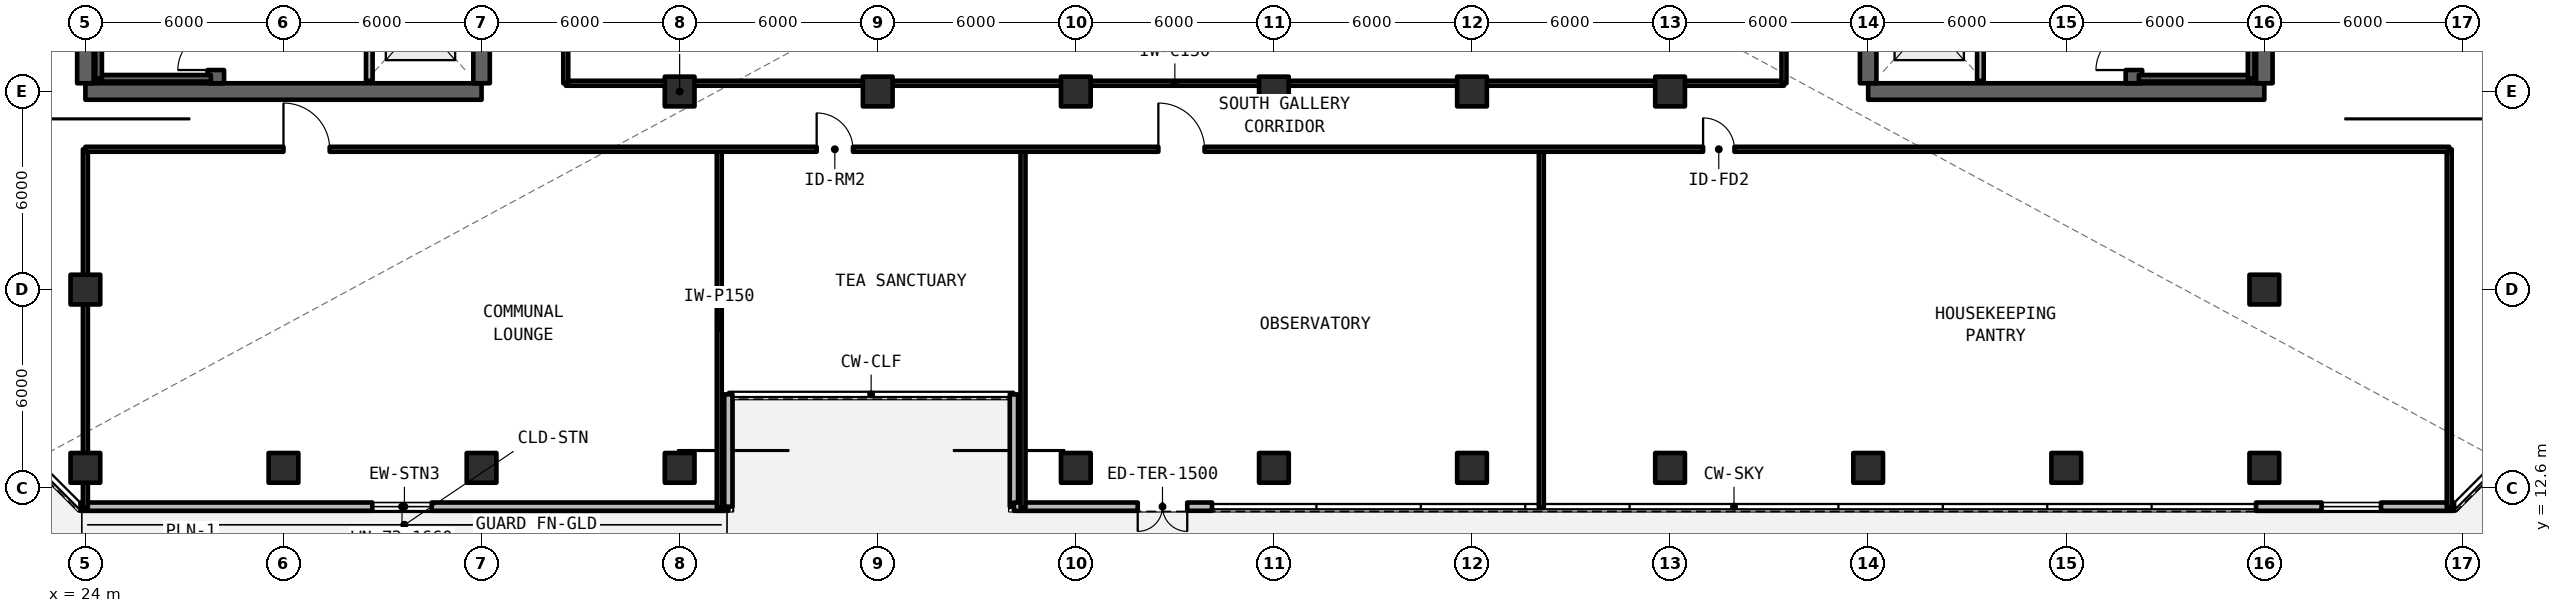
"""IFC4 building model, lengths in metres.
Left out: names, types, materials, properties, quantities, classifications, styles, units other than length and angle.
Written with IfcOpenShell. Run it as: python <this file> out.ifc"""

import sys

from ifc_helpers import new_model, si_unit, direction, frame, frame_2d, origin, origin_2d, place, context, subcontext, project, spatial, rectangle, extrude, element, fill, save


model = new_model("IFC4")
c1 = context("Model", 3, precision=1e-05, world=origin(), true_north=direction((0.0, 1.0)))
c2 = subcontext(c1, "Body", "Model", "MODEL_VIEW")
j1 = project(units=[si_unit("LENGTHUNIT", "METRE"), si_unit("PLANEANGLEUNIT", "RADIAN")], contexts=[c1])
p1 = place(None, origin())
s1 = spatial("IfcSite", under=j1, at=p1, CompositionType="ELEMENT")
p2 = place(p1, origin())
s2 = spatial("IfcBuilding", under=s1, at=p2, CompositionType="ELEMENT")
p3 = place(p2, frame((0.0, 0.0, 128.04)))
s3 = spatial("IfcBuildingStorey", under=s2, at=p3, CompositionType="ELEMENT", Elevation=128.04)
p4 = place(p3, frame((24.0, 24.6, 0.0), z_axis=(0.0, 0.0, 1.0), x_axis=(1.0, 0.0, 0.0)))
e1 = element("IfcWall", 1, at=p4, inside=s3, PredefinedType="SHEAR", context=c2, shape_type="SweptSolid", body=[
    extrude(rectangle(XDim=12.0, YDim=0.5, at=frame_2d((6.0, 0.0))), origin(), (0.0, 0.0, 1.0), 3.96),
])
p5 = place(p3, frame((24.0, 24.85, 0.0), z_axis=(0.0, 0.0, 1.0), x_axis=(0.0, 1.0, 0.0)))
e2 = element("IfcWall", 2, at=p5, inside=s3, PredefinedType="SHEAR", context=c2, shape_type="SweptSolid", body=[
    extrude(rectangle(XDim=17.5, YDim=0.5, at=frame_2d((8.75, 0.0))), origin(), (0.0, 0.0, 1.0), 3.96),
])
p6 = place(p3, frame((36.0, 24.85, 0.0), z_axis=(0.0, 0.0, 1.0), x_axis=(0.0, 1.0, 0.0)))
e3 = element("IfcWall", 3, at=p6, inside=s3, PredefinedType="SHEAR", context=c2, shape_type="SweptSolid", body=[
    extrude(rectangle(XDim=8.95, YDim=0.5, at=frame_2d((4.475, 0.0))), origin(), (0.0, 0.0, 1.0), 3.96),
])
p7 = place(p3, frame((27.95, 24.85, 0.0), z_axis=(0.0, 0.0, 1.0), x_axis=(0.0, 1.0, 0.0)))
e4 = element("IfcWall", 4, at=p7, inside=s3, PredefinedType="SHEAR", context=c2, shape_type="SweptSolid", body=[
    extrude(rectangle(XDim=17.5, YDim=0.5, at=frame_2d((8.75, 0.0))), origin(), (0.0, 0.0, 1.0), 3.96),
])
p8 = place(p7, frame((0.4, 0.0, 0.0)))
e5 = element("IfcOpeningElement", 5, at=p8, cuts=e4, PredefinedType="OPENING", context=c2, shape_type="SweptSolid", body=[
    extrude(rectangle(XDim=1.15, YDim=2.15, at=frame_2d((0.575, 1.075))), frame((0.0, 0.26, 0.0), z_axis=(0.0, -1.0, 0.0), x_axis=(1.0, 0.0, 0.0)), (0.0, 0.0, 1.0), 0.52),
])
p9 = place(p7, frame((9.6, 0.0, 0.0)))
e6 = element("IfcOpeningElement", 6, at=p9, cuts=e4, PredefinedType="OPENING", context=c2, shape_type="SweptSolid", body=[
    extrude(rectangle(XDim=1.15, YDim=2.15, at=frame_2d((0.575, 1.075))), frame((0.0, 0.26, 0.0), z_axis=(0.0, -1.0, 0.0), x_axis=(1.0, 0.0, 0.0)), (0.0, 0.0, 1.0), 0.52),
])
p10 = place(p3, frame((78.0, 24.6, 0.0), z_axis=(0.0, 0.0, 1.0), x_axis=(1.0, 0.0, 0.0)))
e7 = element("IfcWall", 7, at=p10, inside=s3, PredefinedType="SHEAR", context=c2, shape_type="SweptSolid", body=[
    extrude(rectangle(XDim=12.0, YDim=0.5, at=frame_2d((6.0, 0.0))), origin(), (0.0, 0.0, 1.0), 3.96),
])
p11 = place(p3, frame((90.0, 24.85, 0.0), z_axis=(0.0, 0.0, 1.0), x_axis=(0.0, 1.0, 0.0)))
e8 = element("IfcWall", 8, at=p11, inside=s3, PredefinedType="SHEAR", context=c2, shape_type="SweptSolid", body=[
    extrude(rectangle(XDim=17.5, YDim=0.5, at=frame_2d((8.75, 0.0))), origin(), (0.0, 0.0, 1.0), 3.96),
])
p12 = place(p3, frame((78.0, 24.85, 0.0), z_axis=(0.0, 0.0, 1.0), x_axis=(0.0, 1.0, 0.0)))
e9 = element("IfcWall", 9, at=p12, inside=s3, PredefinedType="SHEAR", context=c2, shape_type="SweptSolid", body=[
    extrude(rectangle(XDim=8.95, YDim=0.5, at=frame_2d((4.475, 0.0))), origin(), (0.0, 0.0, 1.0), 3.96),
])
p13 = place(p3, frame((86.05, 24.85, 0.0), z_axis=(0.0, 0.0, 1.0), x_axis=(0.0, 1.0, 0.0)))
e10 = element("IfcWall", 10, at=p13, inside=s3, PredefinedType="SHEAR", context=c2, shape_type="SweptSolid", body=[
    extrude(rectangle(XDim=17.5, YDim=0.5, at=frame_2d((8.75, 0.0))), origin(), (0.0, 0.0, 1.0), 3.96),
])
p14 = place(p13, frame((0.4, 0.0, 0.0)))
e11 = element("IfcOpeningElement", 11, at=p14, cuts=e10, PredefinedType="OPENING", context=c2, shape_type="SweptSolid", body=[
    extrude(rectangle(XDim=1.15, YDim=2.15, at=frame_2d((0.575, 1.075))), frame((0.0, 0.26, 0.0), z_axis=(0.0, -1.0, 0.0), x_axis=(1.0, 0.0, 0.0)), (0.0, 0.0, 1.0), 0.52),
])
p15 = place(p13, frame((9.6, 0.0, 0.0)))
e12 = element("IfcOpeningElement", 12, at=p15, cuts=e10, PredefinedType="OPENING", context=c2, shape_type="SweptSolid", body=[
    extrude(rectangle(XDim=1.15, YDim=2.15, at=frame_2d((0.575, 1.075))), frame((0.0, 0.26, 0.0), z_axis=(0.0, -1.0, 0.0), x_axis=(1.0, 0.0, 0.0)), (0.0, 0.0, 1.0), 0.52),
])
for number, where, z_axis, x_axis in (
    (13, (42.0, 24.6, 0.0), (0.0, 0.0, 1.0), (1.0, 0.0, 0.0)),
    (14, (48.0, 24.6, 0.0), (0.0, 0.0, 1.0), (1.0, 0.0, 0.0)),
    (15, (54.0, 24.6, 0.0), (0.0, 0.0, 1.0), (1.0, 0.0, 0.0)),
    (16, (60.0, 24.6, 0.0), (0.0, 0.0, 1.0), (1.0, 0.0, 0.0)),
    (17, (66.0, 24.6, 0.0), (0.0, 0.0, 1.0), (1.0, 0.0, 0.0)),
    (18, (72.0, 24.6, 0.0), (0.0, 0.0, 1.0), (1.0, 0.0, 0.0)),
    (19, (24.0, 18.6, 0.0), (0.0, 0.0, 1.0), (1.0, 0.0, 0.0)),
    (20, (90.0, 18.6, 0.0), (0.0, 0.0, 1.0), (1.0, 0.0, 0.0)),
):
    element("IfcColumn", number, at=place(p3, frame(where, z_axis=z_axis, x_axis=x_axis)), inside=s3, PredefinedType="COLUMN", context=c2, shape_type="SweptSolid", body=[
        extrude(rectangle(XDim=0.9, YDim=0.9, at=origin_2d()), origin(), (0.0, 0.0, 1.0), 3.96),
    ])
for number, where, z_axis, x_axis in (
    (21, (24.0, 13.2, -0.28), (0.0, 0.0, 1.0), (1.0, 0.0, 0.0)),
    (22, (30.0, 13.2, -0.28), (0.0, 0.0, 1.0), (1.0, 0.0, 0.0)),
    (23, (36.0, 13.2, -0.28), (0.0, 0.0, 1.0), (1.0, 0.0, 0.0)),
    (24, (42.0, 13.2, -0.28), (0.0, 0.0, 1.0), (1.0, 0.0, 0.0)),
    (25, (54.0, 13.2, -0.28), (0.0, 0.0, 1.0), (1.0, 0.0, 0.0)),
    (26, (60.0, 13.2, -0.28), (0.0, 0.0, 1.0), (1.0, 0.0, 0.0)),
    (27, (66.0, 13.2, -0.28), (0.0, 0.0, 1.0), (1.0, 0.0, 0.0)),
    (28, (72.0, 13.2, -0.28), (0.0, 0.0, 1.0), (1.0, 0.0, 0.0)),
    (29, (78.0, 13.2, -0.28), (0.0, 0.0, 1.0), (1.0, 0.0, 0.0)),
    (30, (84.0, 13.2, -0.28), (0.0, 0.0, 1.0), (1.0, 0.0, 0.0)),
    (31, (90.0, 13.2, -0.28), (0.0, 0.0, 1.0), (1.0, 0.0, 0.0)),
):
    element("IfcColumn", number, at=place(p3, frame(where, z_axis=z_axis, x_axis=x_axis)), inside=s3, PredefinedType="COLUMN", context=c2, shape_type="SweptSolid", body=[
        extrude(rectangle(XDim=0.9, YDim=0.9, at=origin_2d()), origin(), (0.0, 0.0, 1.0), 4.24),
    ])
p16 = place(p3, frame((23.852, 12.025, 0.0), z_axis=(0.0, 0.0, 1.0), x_axis=(1.0, 0.0, 0.0)))
e32 = element("IfcWall", 32, at=p16, inside=s3, PredefinedType="SOLIDWALL", context=c2, shape_type="SweptSolid", body=[
    extrude(rectangle(XDim=19.623, YDim=0.25, at=frame_2d((9.812, 0.0))), origin(), (0.0, 0.0, 1.0), 3.74),
])
p17 = place(p16, frame((8.838, 0.0, 0.78)))
e33 = element("IfcOpeningElement", 33, at=p17, cuts=e32, PredefinedType="OPENING", context=c2, shape_type="SweptSolid", body=[
    extrude(rectangle(XDim=1.8, YDim=1.66, at=frame_2d((0.9, 0.83))), frame((0.0, 0.135, 0.0), z_axis=(0.0, -1.0, 0.0), x_axis=(1.0, 0.0, 0.0)), (0.0, 0.0, 1.0), 0.27),
])
for number, where, z_axis, x_axis in (
    (34, (43.475, 12.025, 0.0), (0.0, 0.0, 1.0), (0.0, 1.0, 0.0)),
    (35, (52.125, 15.425, 0.0), (0.0, 0.0, 1.0), (0.0, -1.0, 0.0)),
):
    element("IfcWall", number, at=place(p3, frame(where, z_axis=z_axis, x_axis=x_axis)), inside=s3, PredefinedType="SOLIDWALL", context=c2, shape_type="SweptSolid", body=[
        extrude(rectangle(XDim=3.4, YDim=0.25, at=frame_2d((1.7, 0.0))), origin(), (0.0, 0.0, 1.0), 3.74),
    ])
p18 = place(p3, frame((52.125, 12.025, 0.0), z_axis=(0.0, 0.0, 1.0), x_axis=(1.0, 0.0, 0.0)))
e36 = element("IfcWall", 36, at=p18, inside=s3, PredefinedType="SOLIDWALL", context=c2, shape_type="SweptSolid", body=[
    extrude(rectangle(XDim=6.0, YDim=0.25, at=frame_2d((3.0, 0.0))), origin(), (0.0, 0.0, 1.0), 3.74),
])
p19 = place(p18, frame((3.75, 0.0, 0.0)))
e37 = element("IfcOpeningElement", 37, at=p19, cuts=e36, PredefinedType="OPENING", context=c2, shape_type="SweptSolid", body=[
    extrude(rectangle(XDim=1.5, YDim=2.2, at=frame_2d((0.75, 1.1))), frame((0.0, 0.135, 0.0), z_axis=(0.0, -1.0, 0.0), x_axis=(1.0, 0.0, 0.0)), (0.0, 0.0, 1.0), 0.27),
])
p20 = place(p3, frame((89.748, 12.025, 0.0), z_axis=(0.0, 0.0, 1.0), x_axis=(1.0, 0.0, 0.0)))
e38 = element("IfcWall", 38, at=p20, inside=s3, PredefinedType="SOLIDWALL", context=c2, shape_type="SweptSolid", body=[
    extrude(rectangle(XDim=6.0, YDim=0.25, at=frame_2d((3.0, 0.0))), origin(), (0.0, 0.0, 1.0), 3.74),
])
p21 = place(p20, frame((1.986, 0.0, 0.78)))
e39 = element("IfcOpeningElement", 39, at=p21, cuts=e38, PredefinedType="OPENING", context=c2, shape_type="SweptSolid", body=[
    extrude(rectangle(XDim=1.8, YDim=1.66, at=frame_2d((0.9, 0.83))), frame((0.0, 0.135, 0.0), z_axis=(0.0, -1.0, 0.0), x_axis=(1.0, 0.0, 0.0)), (0.0, 0.0, 1.0), 0.27),
])
p22 = place(p3, frame((32.6, 24.92, 0.0), z_axis=(0.0, 0.0, 1.0), x_axis=(0.0, 1.0, 0.0)))
e40 = element("IfcWall", 40, at=p22, inside=s3, PredefinedType="SOLIDWALL", context=c2, shape_type="SweptSolid", body=[
    extrude(rectangle(XDim=3.58, YDim=0.2, at=frame_2d((1.79, 0.0))), origin(), (0.0, 0.0, 1.0), 2.96),
])
p23 = place(p22, frame((1.3, 0.0, 0.0)))
e41 = element("IfcOpeningElement", 41, at=p23, cuts=e40, PredefinedType="OPENING", context=c2, shape_type="SweptSolid", body=[
    extrude(rectangle(XDim=1.1, YDim=2.2, at=frame_2d((0.55, 1.1))), frame((0.0, 0.11, 0.0), z_axis=(0.0, -1.0, 0.0), x_axis=(1.0, 0.0, 0.0)), (0.0, 0.0, 1.0), 0.22),
])
p24 = place(p3, frame((81.4, 24.92, 0.0), z_axis=(0.0, 0.0, 1.0), x_axis=(0.0, 1.0, 0.0)))
e42 = element("IfcWall", 42, at=p24, inside=s3, PredefinedType="SOLIDWALL", context=c2, shape_type="SweptSolid", body=[
    extrude(rectangle(XDim=3.58, YDim=0.2, at=frame_2d((1.79, 0.0))), origin(), (0.0, 0.0, 1.0), 2.96),
])
p25 = place(p24, frame((1.3, 0.0, 0.0)))
e43 = element("IfcOpeningElement", 43, at=p25, cuts=e42, PredefinedType="OPENING", context=c2, shape_type="SweptSolid", body=[
    extrude(rectangle(XDim=1.1, YDim=2.2, at=frame_2d((0.55, 1.1))), frame((0.0, 0.11, 0.0), z_axis=(0.0, -1.0, 0.0), x_axis=(1.0, 0.0, 0.0)), (0.0, 0.0, 1.0), 0.22),
])
p26 = place(p3, frame((38.55, 24.85, 0.0), z_axis=(0.0, 0.0, 1.0), x_axis=(1.0, 0.0, 0.0)))
e44 = element("IfcWall", 44, at=p26, inside=s3, PredefinedType="SOLIDWALL", context=c2, shape_type="SweptSolid", body=[
    extrude(rectangle(XDim=36.9, YDim=0.15, at=frame_2d((18.45, 0.0))), origin(), (0.0, 0.0, 1.0), 2.96),
])
p27 = place(p3, frame((38.55, 24.85, 0.0), z_axis=(0.0, 0.0, 1.0), x_axis=(0.0, 1.0, 0.0)))
e45 = element("IfcWall", 45, at=p27, inside=s3, PredefinedType="SOLIDWALL", context=c2, shape_type="SweptSolid", body=[
    extrude(rectangle(XDim=17.5, YDim=0.15, at=frame_2d((8.75, 0.0))), origin(), (0.0, 0.0, 1.0), 2.96),
])
p28 = place(p27, frame((7.8, 0.0, 0.0)))
e46 = element("IfcOpeningElement", 46, at=p28, cuts=e45, PredefinedType="OPENING", context=c2, shape_type="SweptSolid", body=[
    extrude(rectangle(XDim=1.4, YDim=2.15, at=frame_2d((0.7, 1.075))), frame((0.0, 0.085, 0.0), z_axis=(0.0, -1.0, 0.0), x_axis=(1.0, 0.0, 0.0)), (0.0, 0.0, 1.0), 0.17),
])
p29 = place(p3, frame((75.45, 24.85, 0.0), z_axis=(0.0, 0.0, 1.0), x_axis=(0.0, 1.0, 0.0)))
e47 = element("IfcWall", 47, at=p29, inside=s3, PredefinedType="SOLIDWALL", context=c2, shape_type="SweptSolid", body=[
    extrude(rectangle(XDim=17.5, YDim=0.15, at=frame_2d((8.75, 0.0))), origin(), (0.0, 0.0, 1.0), 2.96),
])
p30 = place(p3, frame((24.0, 12.0, 0.0), z_axis=(0.0, 0.0, 1.0), x_axis=(0.0, 1.0, 0.0)))
e48 = element("IfcWall", 48, at=p30, inside=s3, PredefinedType="SOLIDWALL", context=c2, shape_type="SweptSolid", body=[
    extrude(rectangle(XDim=10.85, YDim=0.15, at=frame_2d((5.425, 0.0))), origin(), (0.0, 0.0, 1.0), 2.96),
])
for number, where, z_axis, x_axis in (
    (49, (43.2, 12.0, 0.0), (0.0, 0.0, 1.0), (0.0, 1.0, 0.0)),
    (50, (52.4, 12.0, 0.0), (0.0, 0.0, 1.0), (0.0, 1.0, 0.0)),
    (51, (68.1, 12.0, 0.0), (0.0, 0.0, 1.0), (0.0, 1.0, 0.0)),
):
    element("IfcWall", number, at=place(p3, frame(where, z_axis=z_axis, x_axis=x_axis)), inside=s3, PredefinedType="PARTITIONING", context=c2, shape_type="SweptSolid", body=[
        extrude(rectangle(XDim=10.85, YDim=0.15, at=frame_2d((5.425, 0.0))), origin(), (0.0, 0.0, 1.0), 2.96),
    ])
p31 = place(p3, frame((95.6, 12.0, 0.0), z_axis=(0.0, 0.0, 1.0), x_axis=(0.0, 1.0, 0.0)))
e52 = element("IfcWall", 52, at=p31, inside=s3, PredefinedType="SOLIDWALL", context=c2, shape_type="SweptSolid", body=[
    extrude(rectangle(XDim=10.85, YDim=0.15, at=frame_2d((5.425, 0.0))), origin(), (0.0, 0.0, 1.0), 2.96),
])
p32 = place(p3, frame((24.0, 22.85, 0.0), z_axis=(0.0, 0.0, 1.0), x_axis=(1.0, 0.0, 0.0)))
e53 = element("IfcWall", 53, at=p32, inside=s3, PredefinedType="SOLIDWALL", context=c2, shape_type="SweptSolid", body=[
    extrude(rectangle(XDim=71.6, YDim=0.15, at=frame_2d((35.8, 0.0))), origin(), (0.0, 0.0, 1.0), 2.96),
])
p33 = place(p32, frame((6.0, 0.0, 0.0)))
e54 = element("IfcOpeningElement", 54, at=p33, cuts=e53, PredefinedType="OPENING", context=c2, shape_type="SweptSolid", body=[
    extrude(rectangle(XDim=1.4, YDim=2.15, at=frame_2d((0.7, 1.075))), frame((0.0, 0.085, 0.0), z_axis=(0.0, -1.0, 0.0), x_axis=(1.0, 0.0, 0.0)), (0.0, 0.0, 1.0), 0.17),
])
p34 = place(p32, frame((22.15, 0.0, 0.0)))
e55 = element("IfcOpeningElement", 55, at=p34, cuts=e53, PredefinedType="OPENING", context=c2, shape_type="SweptSolid", body=[
    extrude(rectangle(XDim=1.1, YDim=2.15, at=frame_2d((0.55, 1.075))), frame((0.0, 0.085, 0.0), z_axis=(0.0, -1.0, 0.0), x_axis=(1.0, 0.0, 0.0)), (0.0, 0.0, 1.0), 0.17),
])
p35 = place(p32, frame((32.5, 0.0, 0.0)))
e56 = element("IfcOpeningElement", 56, at=p35, cuts=e53, PredefinedType="OPENING", context=c2, shape_type="SweptSolid", body=[
    extrude(rectangle(XDim=1.4, YDim=2.15, at=frame_2d((0.7, 1.075))), frame((0.0, 0.085, 0.0), z_axis=(0.0, -1.0, 0.0), x_axis=(1.0, 0.0, 0.0)), (0.0, 0.0, 1.0), 0.17),
])
p36 = place(p32, frame((49.0, 0.0, 0.0)))
e57 = element("IfcOpeningElement", 57, at=p36, cuts=e53, PredefinedType="OPENING", context=c2, shape_type="SweptSolid", body=[
    extrude(rectangle(XDim=0.95, YDim=2.15, at=frame_2d((0.475, 1.075))), frame((0.0, 0.085, 0.0), z_axis=(0.0, -1.0, 0.0), x_axis=(1.0, 0.0, 0.0)), (0.0, 0.0, 1.0), 0.17),
])
p37 = place(p3, frame((24.4, 25.0, 0.0), z_axis=(0.0, 0.0, 1.0), x_axis=(1.0, 0.0, 0.0)))
e58 = element("IfcWall", 58, at=p37, inside=s3, PredefinedType="SOLIDWALL", context=c2, shape_type="SweptSolid", body=[
    extrude(rectangle(XDim=3.4, YDim=0.2, at=frame_2d((1.7, 0.0))), origin(), (0.0, 0.0, 1.0), 3.96),
])
p38 = place(p3, frame((24.4, 33.0, 0.0), z_axis=(0.0, 0.0, 1.0), x_axis=(0.0, -1.0, 0.0)))
e59 = element("IfcWall", 59, at=p38, inside=s3, PredefinedType="SOLIDWALL", context=c2, shape_type="SweptSolid", body=[
    extrude(rectangle(XDim=8.0, YDim=0.2, at=frame_2d((4.0, 0.0))), origin(), (0.0, 0.0, 1.0), 3.96),
])
p39 = place(p3, frame((86.2, 25.0, 0.0), z_axis=(0.0, 0.0, 1.0), x_axis=(1.0, 0.0, 0.0)))
e60 = element("IfcWall", 60, at=p39, inside=s3, PredefinedType="SOLIDWALL", context=c2, shape_type="SweptSolid", body=[
    extrude(rectangle(XDim=3.4, YDim=0.2, at=frame_2d((1.7, 0.0))), origin(), (0.0, 0.0, 1.0), 3.96),
])
p40 = place(p3, frame((89.6, 25.0, 0.0), z_axis=(0.0, 0.0, 1.0), x_axis=(0.0, 1.0, 0.0)))
e61 = element("IfcWall", 61, at=p40, inside=s3, PredefinedType="SOLIDWALL", context=c2, shape_type="SweptSolid", body=[
    extrude(rectangle(XDim=8.0, YDim=0.2, at=frame_2d((4.0, 0.0))), origin(), (0.0, 0.0, 1.0), 3.96),
])
p41 = place(p17, origin())
e62 = element("IfcWindow", 62, at=p41, inside=s3, PartitioningType="SINGLE_PANEL", PredefinedType="WINDOW", context=c2, shape_type="SweptSolid", body=[
    extrude(rectangle(XDim=1.8, YDim=1.66, at=frame_2d((0.9, 0.83))), frame((0.0, 0.03, 0.0), z_axis=(0.0, -1.0, 0.0), x_axis=(1.0, 0.0, 0.0)), (0.0, 0.0, 1.0), 0.06),
])
fill(e33, e62)
p42 = place(p19, frame((1.5, 0.0, 0.0), z_axis=(0.0, 0.0, 1.0), x_axis=(-1.0, 0.0, 0.0)))
e63 = element("IfcDoor", 63, at=p42, inside=s3, OperationType="SINGLE_SWING_RIGHT", PredefinedType="DOOR", context=c2, shape_type="SweptSolid", body=[
    extrude(rectangle(XDim=1.5, YDim=2.2, at=frame_2d((0.75, 1.1))), frame((0.0, 0.025, 0.0), z_axis=(0.0, -1.0, 0.0), x_axis=(1.0, 0.0, 0.0)), (0.0, 0.0, 1.0), 0.05),
])
fill(e37, e63)
p43 = place(p21, origin())
e64 = element("IfcWindow", 64, at=p43, inside=s3, PartitioningType="SINGLE_PANEL", PredefinedType="WINDOW", context=c2, shape_type="SweptSolid", body=[
    extrude(rectangle(XDim=1.8, YDim=1.66, at=frame_2d((0.9, 0.83))), frame((0.0, 0.03, 0.0), z_axis=(0.0, -1.0, 0.0), x_axis=(1.0, 0.0, 0.0)), (0.0, 0.0, 1.0), 0.06),
])
fill(e39, e64)
p44 = place(p33, origin())
e65 = element("IfcDoor", 65, at=p44, inside=s3, OperationType="SINGLE_SWING_RIGHT", PredefinedType="DOOR", context=c2, shape_type="SweptSolid", body=[
    extrude(rectangle(XDim=1.4, YDim=2.15, at=frame_2d((0.7, 1.075))), frame((0.0, 0.025, 0.0), z_axis=(0.0, -1.0, 0.0), x_axis=(1.0, 0.0, 0.0)), (0.0, 0.0, 1.0), 0.05),
])
fill(e54, e65)
p45 = place(p34, origin())
e66 = element("IfcDoor", 66, at=p45, inside=s3, OperationType="SINGLE_SWING_LEFT", PredefinedType="DOOR", context=c2, shape_type="SweptSolid", body=[
    extrude(rectangle(XDim=1.1, YDim=2.15, at=frame_2d((0.55, 1.075))), frame((0.0, 0.025, 0.0), z_axis=(0.0, -1.0, 0.0), x_axis=(1.0, 0.0, 0.0)), (0.0, 0.0, 1.0), 0.05),
])
fill(e55, e66)
p46 = place(p35, origin())
e67 = element("IfcDoor", 67, at=p46, inside=s3, OperationType="SINGLE_SWING_RIGHT", PredefinedType="DOOR", context=c2, shape_type="SweptSolid", body=[
    extrude(rectangle(XDim=1.4, YDim=2.15, at=frame_2d((0.7, 1.075))), frame((0.0, 0.025, 0.0), z_axis=(0.0, -1.0, 0.0), x_axis=(1.0, 0.0, 0.0)), (0.0, 0.0, 1.0), 0.05),
])
fill(e56, e67)
p47 = place(p36, origin())
e68 = element("IfcDoor", 68, at=p47, inside=s3, OperationType="SINGLE_SWING_LEFT", PredefinedType="DOOR", context=c2, shape_type="SweptSolid", body=[
    extrude(rectangle(XDim=0.95, YDim=2.15, at=frame_2d((0.475, 1.075))), frame((0.0, 0.025, 0.0), z_axis=(0.0, -1.0, 0.0), x_axis=(1.0, 0.0, 0.0)), (0.0, 0.0, 1.0), 0.05),
])
fill(e57, e68)
p48 = place(p8, origin())
e69 = element("IfcDoor", 69, at=p48, inside=s3, OperationType="SINGLE_SWING_LEFT", PredefinedType="DOOR", context=c2, shape_type="SweptSolid", body=[
    extrude(rectangle(XDim=1.15, YDim=2.15, at=frame_2d((0.575, 1.075))), frame((0.0, 0.025, 0.0), z_axis=(0.0, -1.0, 0.0), x_axis=(1.0, 0.0, 0.0)), (0.0, 0.0, 1.0), 0.05),
])
fill(e5, e69)
p49 = place(p14, origin())
e70 = element("IfcDoor", 70, at=p49, inside=s3, OperationType="SINGLE_SWING_LEFT", PredefinedType="DOOR", context=c2, shape_type="SweptSolid", body=[
    extrude(rectangle(XDim=1.15, YDim=2.15, at=frame_2d((0.575, 1.075))), frame((0.0, 0.025, 0.0), z_axis=(0.0, -1.0, 0.0), x_axis=(1.0, 0.0, 0.0)), (0.0, 0.0, 1.0), 0.05),
])
fill(e11, e70)
save(model, sys.argv[1])
